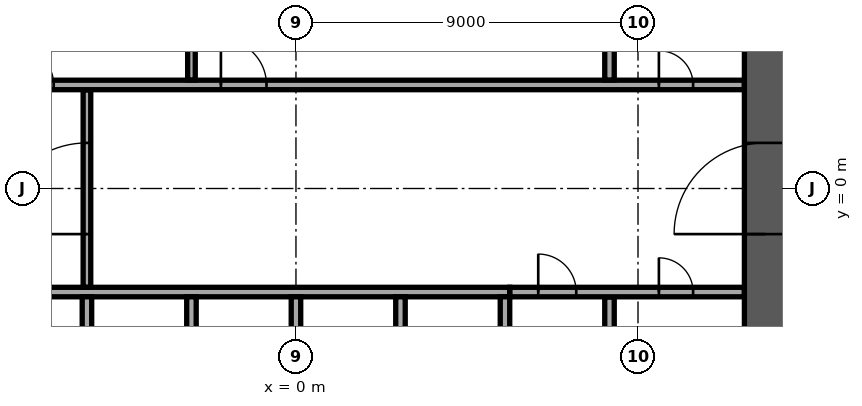
"""IFC4 building model, lengths in metres.
Left out: names, types, materials, properties, quantities, classifications, styles, units other than length and angle.
Written with IfcOpenShell. Run it as: python <this file> out.ifc"""

import sys

from ifc_helpers import new_model, si_unit, direction, frame, frame_2d, origin, place, context, subcontext, project, spatial, rectangle, extrude, element, fill, save


model = new_model("IFC4")
c1 = context("Model", 3, precision=1e-05, world=origin(), true_north=direction((0.0, 1.0)))
c2 = subcontext(c1, "Body", "Model", "MODEL_VIEW")
j1 = project(units=[si_unit("LENGTHUNIT", "METRE"), si_unit("PLANEANGLEUNIT", "RADIAN")], contexts=[c1])
p1 = place(None, origin())
s1 = spatial("IfcSite", under=j1, at=p1, CompositionType="ELEMENT")
p2 = place(p1, origin())
s2 = spatial("IfcBuilding", under=s1, at=p2, CompositionType="ELEMENT")
p3 = place(p2, frame((0.0, 0.0, 86.1)))
s3 = spatial("IfcBuildingStorey", under=s2, at=p3, CompositionType="ELEMENT", Elevation=86.1)
p4 = place(p3, frame((12.35, -11.8, 0.0), z_axis=(0.0, 0.0, 1.0), x_axis=(0.0, 1.0, 0.0)))
e1 = element("IfcWall", 1, at=p4, inside=s3, PredefinedType="SHEAR", context=c2, shape_type="SweptSolid", body=[
    extrude(rectangle(XDim=23.6, YDim=1.1, at=frame_2d((11.8, 0.0))), origin(), (0.0, 0.0, 1.0), 3.58),
])
p5 = place(p4, frame((10.6, 0.0, 0.0)))
e2 = element("IfcOpeningElement", 2, at=p5, cuts=e1, PredefinedType="OPENING", context=c2, shape_type="SweptSolid", body=[
    extrude(rectangle(XDim=2.4, YDim=2.4, at=frame_2d((1.2, 1.2))), frame((0.0, 0.56, 0.0), z_axis=(0.0, -1.0, 0.0), x_axis=(1.0, 0.0, 0.0)), (0.0, 0.0, 1.0), 1.12),
])
p6 = place(p3, frame((-8.375, -2.725, 0.0), z_axis=(0.0, 0.0, 1.0), x_axis=(1.0, 0.0, 0.0)))
e3 = element("IfcWall", 3, at=p6, inside=s3, PredefinedType="SOLIDWALL", context=c2, shape_type="SweptSolid", body=[
    extrude(rectangle(XDim=14.0, YDim=0.25, at=frame_2d((7.0, 0.0))), origin(), (0.0, 0.0, 1.0), 3.58),
])
for number, where, z_axis, x_axis in (
    (4, (-5.5, -5.55, 0.0), (0.0, 0.0, 1.0), (0.0, 1.0, 0.0)),
    (5, (-2.75, -5.55, 0.0), (0.0, 0.0, 1.0), (0.0, 1.0, 0.0)),
    (6, (0.0, -5.55, 0.0), (0.0, 0.0, 1.0), (0.0, 1.0, 0.0)),
    (7, (2.75, -5.55, 0.0), (0.0, 0.0, 1.0), (0.0, 1.0, 0.0)),
    (8, (5.5, -5.55, 0.0), (0.0, 0.0, 1.0), (0.0, 1.0, 0.0)),
):
    element("IfcWall", number, at=place(p3, frame(where, z_axis=z_axis, x_axis=x_axis)), inside=s3, PredefinedType="SOLIDWALL", context=c2, shape_type="SweptSolid", body=[
        extrude(rectangle(XDim=2.7, YDim=0.25, at=frame_2d((1.35, 0.0))), origin(), (0.0, 0.0, 1.0), 3.58),
    ])
p7 = place(p3, frame((8.25, -5.545, 0.0), z_axis=(0.0, 0.0, 1.0), x_axis=(0.0, 1.0, 0.0)))
e9 = element("IfcWall", 9, at=p7, inside=s3, PredefinedType="PARTITIONING", context=c2, shape_type="SweptSolid", body=[
    extrude(rectangle(XDim=2.69, YDim=0.25, at=frame_2d((1.345, 0.0))), origin(), (0.0, 0.0, 1.0), 3.58),
])
p8 = place(p3, frame((5.63, -2.725, 0.0), z_axis=(0.0, 0.0, 1.0), x_axis=(1.0, 0.0, 0.0)))
e10 = element("IfcWall", 10, at=p8, inside=s3, PredefinedType="PARTITIONING", context=c2, shape_type="SweptSolid", body=[
    extrude(rectangle(XDim=6.165, YDim=0.25, at=frame_2d((3.083, 0.0))), origin(), (0.0, 0.0, 1.0), 3.58),
])
p9 = place(p8, frame((0.745, 0.0, 0.0)))
e11 = element("IfcOpeningElement", 11, at=p9, cuts=e10, PredefinedType="OPENING", context=c2, shape_type="SweptSolid", body=[
    extrude(rectangle(XDim=1.0, YDim=2.1, at=frame_2d((0.5, 1.05))), frame((0.0, 0.135, 0.0), z_axis=(0.0, -1.0, 0.0), x_axis=(1.0, 0.0, 0.0)), (0.0, 0.0, 1.0), 0.27),
])
p10 = place(p8, frame((3.92, 0.0, 0.0)))
e12 = element("IfcOpeningElement", 12, at=p10, cuts=e10, PredefinedType="OPENING", context=c2, shape_type="SweptSolid", body=[
    extrude(rectangle(XDim=0.9, YDim=2.1, at=frame_2d((0.45, 1.05))), frame((0.0, 0.135, 0.0), z_axis=(0.0, -1.0, 0.0), x_axis=(1.0, 0.0, 0.0)), (0.0, 0.0, 1.0), 0.27),
])
p11 = place(p3, frame((-5.5, -2.595, 0.0), z_axis=(0.0, 0.0, 1.0), x_axis=(0.0, 1.0, 0.0)))
e13 = element("IfcWall", 13, at=p11, inside=s3, PredefinedType="PARTITIONING", context=c2, shape_type="SweptSolid", body=[
    extrude(rectangle(XDim=5.19, YDim=0.2, at=frame_2d((2.595, 0.0))), origin(), (0.0, 0.0, 1.0), 3.58),
])
p12 = place(p11, frame((1.395, 0.0, 0.0)))
e14 = element("IfcOpeningElement", 14, at=p12, cuts=e13, PredefinedType="OPENING", context=c2, shape_type="SweptSolid", body=[
    extrude(rectangle(XDim=2.4, YDim=2.4, at=frame_2d((1.2, 1.2))), frame((0.0, 0.11, 0.0), z_axis=(0.0, -1.0, 0.0), x_axis=(1.0, 0.0, 0.0)), (0.0, 0.0, 1.0), 0.22),
])
p13 = place(p3, frame((-11.795, 2.725, 0.0), z_axis=(0.0, 0.0, 1.0), x_axis=(1.0, 0.0, 0.0)))
e15 = element("IfcWall", 15, at=p13, inside=s3, PredefinedType="PARTITIONING", context=c2, shape_type="SweptSolid", body=[
    extrude(rectangle(XDim=23.59, YDim=0.25, at=frame_2d((11.795, 0.0))), origin(), (0.0, 0.0, 1.0), 3.58),
])
p14 = place(p13, frame((21.345, 0.0, 0.0)))
e16 = element("IfcOpeningElement", 16, at=p14, cuts=e15, PredefinedType="OPENING", context=c2, shape_type="SweptSolid", body=[
    extrude(rectangle(XDim=0.9, YDim=2.1, at=frame_2d((0.45, 1.05))), frame((0.0, 0.135, 0.0), z_axis=(0.0, -1.0, 0.0), x_axis=(1.0, 0.0, 0.0)), (0.0, 0.0, 1.0), 0.27),
])
p15 = place(p13, frame((1.345, 0.0, 0.0)))
e17 = element("IfcOpeningElement", 17, at=p15, cuts=e15, PredefinedType="OPENING", context=c2, shape_type="SweptSolid", body=[
    extrude(rectangle(XDim=0.9, YDim=2.1, at=frame_2d((0.45, 1.05))), frame((0.0, 0.135, 0.0), z_axis=(0.0, -1.0, 0.0), x_axis=(1.0, 0.0, 0.0)), (0.0, 0.0, 1.0), 0.27),
])
p16 = place(p13, frame((4.42, 0.0, 0.0)))
e18 = element("IfcOpeningElement", 18, at=p16, cuts=e15, PredefinedType="OPENING", context=c2, shape_type="SweptSolid", body=[
    extrude(rectangle(XDim=1.0, YDim=2.1, at=frame_2d((0.5, 1.05))), frame((0.0, 0.135, 0.0), z_axis=(0.0, -1.0, 0.0), x_axis=(1.0, 0.0, 0.0)), (0.0, 0.0, 1.0), 0.27),
])
p17 = place(p13, frame((9.82, 0.0, 0.0)))
e19 = element("IfcOpeningElement", 19, at=p17, cuts=e15, PredefinedType="OPENING", context=c2, shape_type="SweptSolid", body=[
    extrude(rectangle(XDim=1.2, YDim=2.1, at=frame_2d((0.6, 1.05))), frame((0.0, 0.135, 0.0), z_axis=(0.0, -1.0, 0.0), x_axis=(1.0, 0.0, 0.0)), (0.0, 0.0, 1.0), 0.27),
])
p18 = place(p3, frame((-2.75, 2.855, 0.0), z_axis=(0.0, 0.0, 1.0), x_axis=(0.0, 1.0, 0.0)))
e20 = element("IfcWall", 20, at=p18, inside=s3, PredefinedType="PARTITIONING", context=c2, shape_type="SweptSolid", body=[
    extrude(rectangle(XDim=2.69, YDim=0.2, at=frame_2d((1.345, 0.0))), origin(), (0.0, 0.0, 1.0), 3.58),
])
p19 = place(p3, frame((8.25, 2.855, 0.0), z_axis=(0.0, 0.0, 1.0), x_axis=(0.0, 1.0, 0.0)))
e21 = element("IfcWall", 21, at=p19, inside=s3, PredefinedType="PARTITIONING", context=c2, shape_type="SweptSolid", body=[
    extrude(rectangle(XDim=2.69, YDim=0.25, at=frame_2d((1.345, 0.0))), origin(), (0.0, 0.0, 1.0), 3.58),
])
p20 = place(p5, origin())
e22 = element("IfcDoor", 22, at=p20, inside=s3, OperationType="SINGLE_SWING_LEFT", PredefinedType="DOOR", context=c2, shape_type="SweptSolid", body=[
    extrude(rectangle(XDim=2.4, YDim=2.4, at=frame_2d((1.2, 1.2))), frame((0.0, 0.025, 0.0), z_axis=(0.0, -1.0, 0.0), x_axis=(1.0, 0.0, 0.0)), (0.0, 0.0, 1.0), 0.05),
])
fill(e2, e22)
p21 = place(p9, origin())
e23 = element("IfcDoor", 23, at=p21, inside=s3, OperationType="SINGLE_SWING_RIGHT", PredefinedType="DOOR", context=c2, shape_type="SweptSolid", body=[
    extrude(rectangle(XDim=1.0, YDim=2.1, at=frame_2d((0.5, 1.05))), frame((0.0, 0.025, 0.0), z_axis=(0.0, -1.0, 0.0), x_axis=(1.0, 0.0, 0.0)), (0.0, 0.0, 1.0), 0.05),
])
fill(e11, e23)
p22 = place(p14, origin())
e24 = element("IfcDoor", 24, at=p22, inside=s3, OperationType="SINGLE_SWING_RIGHT", PredefinedType="DOOR", context=c2, shape_type="SweptSolid", body=[
    extrude(rectangle(XDim=0.9, YDim=2.1, at=frame_2d((0.45, 1.05))), frame((0.0, 0.025, 0.0), z_axis=(0.0, -1.0, 0.0), x_axis=(1.0, 0.0, 0.0)), (0.0, 0.0, 1.0), 0.05),
])
fill(e16, e24)
p23 = place(p10, origin())
e25 = element("IfcDoor", 25, at=p23, inside=s3, OperationType="SINGLE_SWING_RIGHT", PredefinedType="DOOR", context=c2, shape_type="SweptSolid", body=[
    extrude(rectangle(XDim=0.9, YDim=2.1, at=frame_2d((0.45, 1.05))), frame((0.0, 0.025, 0.0), z_axis=(0.0, -1.0, 0.0), x_axis=(1.0, 0.0, 0.0)), (0.0, 0.0, 1.0), 0.05),
])
fill(e12, e25)
p24 = place(p16, origin())
e26 = element("IfcDoor", 26, at=p24, inside=s3, OperationType="SINGLE_SWING_RIGHT", PredefinedType="DOOR", context=c2, shape_type="SweptSolid", body=[
    extrude(rectangle(XDim=1.0, YDim=2.1, at=frame_2d((0.5, 1.05))), frame((0.0, 0.025, 0.0), z_axis=(0.0, -1.0, 0.0), x_axis=(1.0, 0.0, 0.0)), (0.0, 0.0, 1.0), 0.05),
])
fill(e18, e26)
p25 = place(p17, origin())
e27 = element("IfcDoor", 27, at=p25, inside=s3, OperationType="SINGLE_SWING_LEFT", PredefinedType="DOOR", context=c2, shape_type="SweptSolid", body=[
    extrude(rectangle(XDim=1.2, YDim=2.1, at=frame_2d((0.6, 1.05))), frame((0.0, 0.025, 0.0), z_axis=(0.0, -1.0, 0.0), x_axis=(1.0, 0.0, 0.0)), (0.0, 0.0, 1.0), 0.05),
])
fill(e19, e27)
p26 = place(p12, origin())
e28 = element("IfcDoor", 28, at=p26, inside=s3, OperationType="DOUBLE_DOOR_DOUBLE_SWING", PredefinedType="DOOR", context=c2, shape_type="SweptSolid", body=[
    extrude(rectangle(XDim=2.4, YDim=2.4, at=frame_2d((1.2, 1.2))), frame((0.0, 0.025, 0.0), z_axis=(0.0, -1.0, 0.0), x_axis=(1.0, 0.0, 0.0)), (0.0, 0.0, 1.0), 0.05),
])
fill(e14, e28)
save(model, sys.argv[1])
